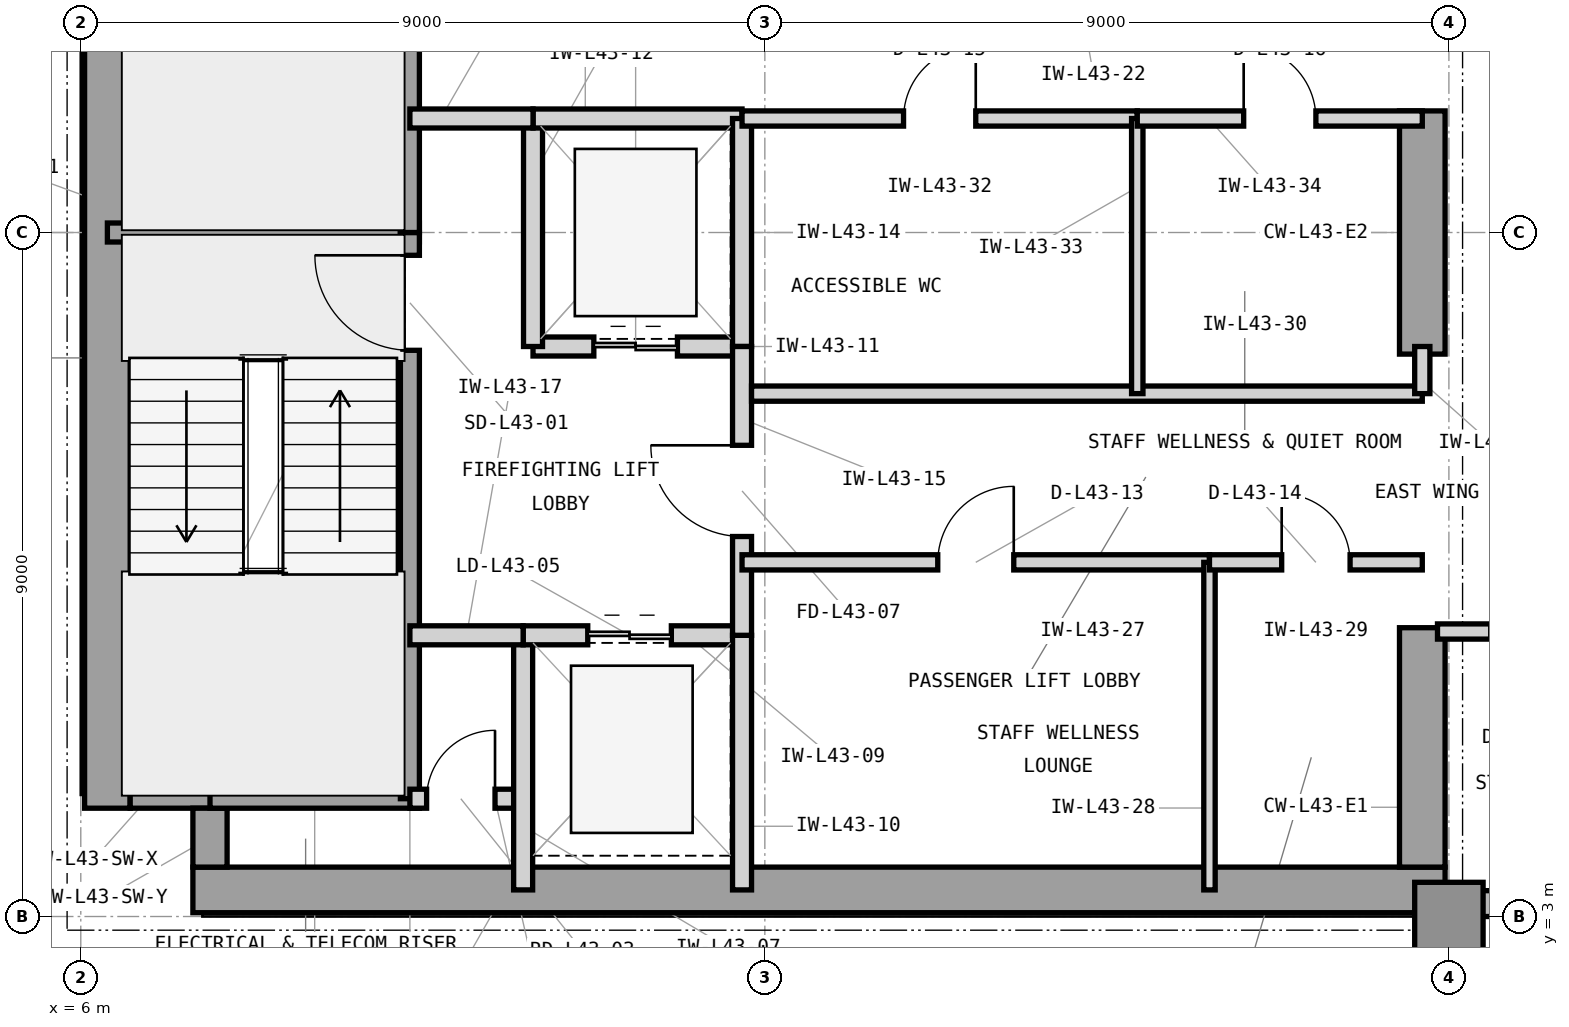
"""IFC4 building model, lengths in metres.
Left out: names, types, materials, properties, quantities, classifications, styles, units other than length and angle.
Written with IfcOpenShell. Run it as: python <this file> out.ifc"""

import sys

from ifc_helpers import new_model, si_unit, direction, frame, frame_2d, origin, origin_2d, place, context, subcontext, project, spatial, rectangle, extrude, element, fill, save


model = new_model("IFC4")
c1 = context("Model", 3, precision=1e-05, world=origin(), true_north=direction((0.0, 1.0)))
c2 = subcontext(c1, "Body", "Model", "MODEL_VIEW")
j1 = project(units=[si_unit("LENGTHUNIT", "METRE"), si_unit("PLANEANGLEUNIT", "RADIAN")], contexts=[c1])
p1 = place(None, origin())
s1 = spatial("IfcSite", under=j1, at=p1, CompositionType="ELEMENT")
p2 = place(p1, origin())
s2 = spatial("IfcBuilding", under=s1, at=p2, CompositionType="ELEMENT")
p3 = place(p2, frame((0.0, 0.0, 180.0)))
s3 = spatial("IfcBuildingStorey", under=s2, at=p3, CompositionType="ELEMENT", Elevation=180.0)
p4 = place(p3, frame((7.475, 3.35, 0.0), z_axis=(0.0, 0.0, 1.0), x_axis=(1.0, 0.0, 0.0)))
e1 = element("IfcWall", 1, at=p4, inside=s3, PredefinedType="SHEAR", context=c2, shape_type="SweptSolid", body=[
    extrude(rectangle(XDim=16.475, YDim=0.6, at=frame_2d((8.237, 0.0))), origin(), (0.0, 0.0, 1.0), 3.9),
])
p5 = place(p3, frame((6.35, 4.425, 0.0), z_axis=(0.0, 0.0, 1.0), x_axis=(0.0, 1.0, 0.0)))
e2 = element("IfcWall", 2, at=p5, inside=s3, PredefinedType="SHEAR", context=c2, shape_type="SweptSolid", body=[
    extrude(rectangle(XDim=15.15, YDim=0.6, at=frame_2d((7.575, 0.0))), origin(), (0.0, 0.0, 1.0), 3.9),
])
p6 = place(p3, frame((23.65, 3.65, 0.0), z_axis=(0.0, 0.0, 1.0), x_axis=(0.0, 1.0, 0.0)))
e3 = element("IfcWall", 3, at=p6, inside=s3, PredefinedType="SHEAR", context=c2, shape_type="SweptSolid", body=[
    extrude(rectangle(XDim=3.15, YDim=0.6, at=frame_2d((1.575, 0.0))), origin(), (0.0, 0.0, 1.0), 3.9),
])
p7 = place(p3, frame((23.65, 10.4, 0.0), z_axis=(0.0, 0.0, 1.0), x_axis=(0.0, 1.0, 0.0)))
e4 = element("IfcWall", 4, at=p7, inside=s3, PredefinedType="SHEAR", context=c2, shape_type="SweptSolid", body=[
    extrude(rectangle(XDim=3.2, YDim=0.6, at=frame_2d((1.6, 0.0))), origin(), (0.0, 0.0, 1.0), 3.9),
])
p8 = place(p3, frame((6.65, 4.65, 0.0), z_axis=(0.0, 0.0, 1.0), x_axis=(1.0, 0.0, 0.0)))
e5 = element("IfcWall", 5, at=p8, inside=s3, PredefinedType="SHEAR", context=c2, shape_type="SweptSolid", body=[
    extrude(rectangle(XDim=1.275, YDim=0.45, at=frame_2d((0.638, 0.0))), origin(), (0.0, 0.0, 1.0), 3.9),
])
p9 = place(p3, frame((7.7, 3.65, 0.0), z_axis=(0.0, 0.0, 1.0), x_axis=(0.0, 1.0, 0.0)))
e6 = element("IfcWall", 6, at=p9, inside=s3, PredefinedType="SHEAR", context=c2, shape_type="SweptSolid", body=[
    extrude(rectangle(XDim=0.775, YDim=0.45, at=frame_2d((0.388, 0.0))), origin(), (0.0, 0.0, 1.0), 3.9),
])
p10 = place(p3, frame((24.0, 3.0, 0.0), z_axis=(0.0, 0.0, 1.0), x_axis=(1.0, 0.0, 0.0)))
e7 = element("IfcColumn", 7, at=p10, inside=s3, PredefinedType="COLUMN", context=c2, shape_type="SweptSolid", body=[
    extrude(rectangle(XDim=0.9, YDim=0.9, at=origin_2d()), origin(), (0.0, 0.0, 1.0), 3.9),
])
p11 = place(p3, frame((23.9, 3.17, 0.0), z_axis=(0.0, 0.0, 1.0), x_axis=(1.0, 0.0, 0.0)))
e8 = element("IfcWall", 8, at=p11, inside=s3, PredefinedType="STANDARD", context=c2, shape_type="SweptSolid", body=[
    extrude(rectangle(XDim=31.5, YDim=0.34, at=frame_2d((15.75, 0.0))), origin(), (0.0, 0.0, 1.0), 3.7),
])
p12 = place(p11, frame((5.6, 0.0, 0.9)))
e9 = element("IfcOpeningElement", 9, at=p12, cuts=e8, PredefinedType="OPENING", context=c2, shape_type="SweptSolid", body=[
    extrude(rectangle(XDim=2.3, YDim=2.2, at=frame_2d((1.15, 1.1))), frame((0.0, 0.18, 0.0), z_axis=(0.0, -1.0, 0.0), x_axis=(1.0, 0.0, 0.0)), (0.0, 0.0, 1.0), 0.36),
])
p13 = place(p11, frame((14.6, 0.0, 0.9)))
e10 = element("IfcOpeningElement", 10, at=p13, cuts=e8, PredefinedType="OPENING", context=c2, shape_type="SweptSolid", body=[
    extrude(rectangle(XDim=2.3, YDim=2.2, at=frame_2d((1.15, 1.1))), frame((0.0, 0.18, 0.0), z_axis=(0.0, -1.0, 0.0), x_axis=(1.0, 0.0, 0.0)), (0.0, 0.0, 1.0), 0.36),
])
p14 = place(p11, frame((19.1, 0.0, 0.9)))
e11 = element("IfcOpeningElement", 11, at=p14, cuts=e8, PredefinedType="OPENING", context=c2, shape_type="SweptSolid", body=[
    extrude(rectangle(XDim=2.3, YDim=2.2, at=frame_2d((1.15, 1.1))), frame((0.0, 0.18, 0.0), z_axis=(0.0, -1.0, 0.0), x_axis=(1.0, 0.0, 0.0)), (0.0, 0.0, 1.0), 0.36),
])
p15 = place(p11, frame((0.9, 0.0, 0.9)))
e12 = element("IfcOpeningElement", 12, at=p15, cuts=e8, PredefinedType="OPENING", context=c2, shape_type="SweptSolid", body=[
    extrude(rectangle(XDim=1.6, YDim=2.2, at=frame_2d((0.8, 1.1))), frame((0.0, 0.18, 0.0), z_axis=(0.0, -1.0, 0.0), x_axis=(1.0, 0.0, 0.0)), (0.0, 0.0, 1.0), 0.36),
])
p16 = place(p3, frame((6.35, 12.0, 0.0), z_axis=(0.0, 0.0, 1.0), x_axis=(1.0, 0.0, 0.0)))
e13 = element("IfcWall", 13, at=p16, inside=s3, PredefinedType="SHEAR", context=c2, shape_type="SweptSolid", body=[
    extrude(rectangle(XDim=4.105, YDim=0.25, at=frame_2d((2.052, 0.0))), origin(), (0.0, 0.0, 1.0), 3.9),
])
p17 = place(p3, frame((7.7, 4.55, 0.0), z_axis=(0.0, 0.0, 1.0), x_axis=(1.0, 0.0, 0.0)))
e14 = element("IfcWall", 14, at=p17, inside=s3, PredefinedType="SHEAR", context=c2, shape_type="SweptSolid", body=[
    extrude(rectangle(XDim=2.755, YDim=0.25, at=frame_2d((1.377, 0.0))), origin(), (0.0, 0.0, 1.0), 3.9),
])
p18 = place(p3, frame((10.33, 4.55, 0.0), z_axis=(0.0, 0.0, 1.0), x_axis=(0.0, 1.0, 0.0)))
e15 = element("IfcWall", 15, at=p18, inside=s3, PredefinedType="SHEAR", context=c2, shape_type="SweptSolid", body=[
    extrude(rectangle(XDim=7.45, YDim=0.25, at=frame_2d((3.725, 0.0))), origin(), (0.0, 0.0, 1.0), 3.9),
])
p19 = place(p18, frame((5.9, 0.0, 0.0)))
e16 = element("IfcOpeningElement", 16, at=p19, cuts=e15, PredefinedType="OPENING", context=c2, shape_type="SweptSolid", body=[
    extrude(rectangle(XDim=1.25, YDim=2.2, at=frame_2d((0.625, 1.1))), frame((0.0, 0.135, 0.0), z_axis=(0.0, -1.0, 0.0), x_axis=(1.0, 0.0, 0.0)), (0.0, 0.0, 1.0), 0.27),
])
p20 = place(p3, frame((10.33, 12.0, 0.0), z_axis=(0.0, 0.0, 1.0), x_axis=(0.0, 1.0, 0.0)))
e17 = element("IfcWall", 17, at=p20, inside=s3, PredefinedType="SHEAR", context=c2, shape_type="SweptSolid", body=[
    extrude(rectangle(XDim=7.45, YDim=0.25, at=frame_2d((3.725, 0.0))), origin(), (0.0, 0.0, 1.0), 3.9),
])
p21 = place(p20, frame((5.85, 0.0, 0.0)))
e18 = element("IfcOpeningElement", 18, at=p21, cuts=e17, PredefinedType="OPENING", context=c2, shape_type="SweptSolid", body=[
    extrude(rectangle(XDim=1.25, YDim=2.2, at=frame_2d((0.625, 1.1))), frame((0.0, 0.135, 0.0), z_axis=(0.0, -1.0, 0.0), x_axis=(1.0, 0.0, 0.0)), (0.0, 0.0, 1.0), 0.27),
])
p22 = place(p3, frame((10.33, 4.55, 0.0), z_axis=(0.0, 0.0, 1.0), x_axis=(1.0, 0.0, 0.0)))
e19 = element("IfcWall", 19, at=p22, inside=s3, PredefinedType="PARTITIONING", context=c2, shape_type="SweptSolid", body=[
    extrude(rectangle(XDim=1.49, YDim=0.25, at=frame_2d((0.745, 0.0))), origin(), (0.0, 0.0, 1.0), 3.69),
])
p23 = place(p22, frame((0.22, 0.0, 0.0)))
e20 = element("IfcOpeningElement", 20, at=p23, cuts=e19, PredefinedType="OPENING", context=c2, shape_type="SweptSolid", body=[
    extrude(rectangle(XDim=0.9, YDim=2.1, at=frame_2d((0.45, 1.05))), frame((0.0, 0.135, 0.0), z_axis=(0.0, -1.0, 0.0), x_axis=(1.0, 0.0, 0.0)), (0.0, 0.0, 1.0), 0.27),
])
p24 = place(p3, frame((11.82, 3.35, 0.0), z_axis=(0.0, 0.0, 1.0), x_axis=(0.0, 1.0, 0.0)))
e21 = element("IfcWall", 21, at=p24, inside=s3, PredefinedType="PARTITIONING", context=c2, shape_type="SweptSolid", body=[
    extrude(rectangle(XDim=3.35, YDim=0.25, at=frame_2d((1.675, 0.0))), origin(), (0.0, 0.0, 1.0), 3.69),
])
p25 = place(p3, frame((11.82, 6.7, 0.0), z_axis=(0.0, 0.0, 1.0), x_axis=(1.0, 0.0, 0.0)))
e22 = element("IfcWall", 22, at=p25, inside=s3, PredefinedType="PARTITIONING", context=c2, shape_type="SweptSolid", body=[
    extrude(rectangle(XDim=2.88, YDim=0.25, at=frame_2d((1.44, 0.0))), origin(), (0.0, 0.0, 1.0), 3.283),
])
p26 = place(p25, frame((0.85, 0.0, 0.0)))
e23 = element("IfcOpeningElement", 23, at=p26, cuts=e22, PredefinedType="OPENING", context=c2, shape_type="SweptSolid", body=[
    extrude(rectangle(XDim=1.1, YDim=2.25, at=frame_2d((0.55, 1.125))), frame((0.0, 0.135, 0.0), z_axis=(0.0, -1.0, 0.0), x_axis=(1.0, 0.0, 0.0)), (0.0, 0.0, 1.0), 0.27),
])
p27 = place(p3, frame((14.7, 3.35, 0.0), z_axis=(0.0, 0.0, 1.0), x_axis=(0.0, 1.0, 0.0)))
e24 = element("IfcWall", 24, at=p27, inside=s3, PredefinedType="PARTITIONING", context=c2, shape_type="SweptSolid", body=[
    extrude(rectangle(XDim=3.35, YDim=0.25, at=frame_2d((1.675, 0.0))), origin(), (0.0, 0.0, 1.0), 3.69),
])
p28 = place(p3, frame((11.95, 10.5, 0.0), z_axis=(0.0, 0.0, 1.0), x_axis=(1.0, 0.0, 0.0)))
e25 = element("IfcWall", 25, at=p28, inside=s3, PredefinedType="PARTITIONING", context=c2, shape_type="SweptSolid", body=[
    extrude(rectangle(XDim=2.75, YDim=0.25, at=frame_2d((1.375, 0.0))), origin(), (0.0, 0.0, 1.0), 3.283),
])
p29 = place(p28, frame((0.8, 0.0, 0.0)))
e26 = element("IfcOpeningElement", 26, at=p29, cuts=e25, PredefinedType="OPENING", context=c2, shape_type="SweptSolid", body=[
    extrude(rectangle(XDim=1.1, YDim=2.25, at=frame_2d((0.55, 1.125))), frame((0.0, 0.135, 0.0), z_axis=(0.0, -1.0, 0.0), x_axis=(1.0, 0.0, 0.0)), (0.0, 0.0, 1.0), 0.27),
])
p30 = place(p3, frame((11.95, 10.5, 0.0), z_axis=(0.0, 0.0, 1.0), x_axis=(0.0, 1.0, 0.0)))
e27 = element("IfcWall", 27, at=p30, inside=s3, PredefinedType="PARTITIONING", context=c2, shape_type="SweptSolid", body=[
    extrude(rectangle(XDim=3.0, YDim=0.25, at=frame_2d((1.5, 0.0))), origin(), (0.0, 0.0, 1.0), 3.69),
])
p31 = place(p3, frame((11.95, 13.5, 0.0), z_axis=(0.0, 0.0, 1.0), x_axis=(1.0, 0.0, 0.0)))
e28 = element("IfcWall", 28, at=p31, inside=s3, PredefinedType="PARTITIONING", context=c2, shape_type="SweptSolid", body=[
    extrude(rectangle(XDim=2.75, YDim=0.25, at=frame_2d((1.375, 0.0))), origin(), (0.0, 0.0, 1.0), 3.283),
])
p32 = place(p3, frame((14.7, 10.5, 0.0), z_axis=(0.0, 0.0, 1.0), x_axis=(0.0, 1.0, 0.0)))
e29 = element("IfcWall", 29, at=p32, inside=s3, PredefinedType="PARTITIONING", context=c2, shape_type="SweptSolid", body=[
    extrude(rectangle(XDim=3.0, YDim=0.25, at=frame_2d((1.5, 0.0))), origin(), (0.0, 0.0, 1.0), 3.69),
])
p33 = place(p3, frame((14.7, 6.7, 0.0), z_axis=(0.0, 0.0, 1.0), x_axis=(0.0, 1.0, 0.0)))
e30 = element("IfcWall", 30, at=p33, inside=s3, PredefinedType="PARTITIONING", context=c2, shape_type="SweptSolid", body=[
    extrude(rectangle(XDim=3.8, YDim=0.25, at=frame_2d((1.9, 0.0))), origin(), (0.0, 0.0, 1.0), 3.69),
])
p34 = place(p33, frame((1.3, 0.0, 0.0)))
e31 = element("IfcOpeningElement", 31, at=p34, cuts=e30, PredefinedType="OPENING", context=c2, shape_type="SweptSolid", body=[
    extrude(rectangle(XDim=1.2, YDim=2.2, at=frame_2d((0.6, 1.1))), frame((0.0, 0.135, 0.0), z_axis=(0.0, -1.0, 0.0), x_axis=(1.0, 0.0, 0.0)), (0.0, 0.0, 1.0), 0.27),
])
p35 = place(p3, frame((10.33, 13.5, 0.0), z_axis=(0.0, 0.0, 1.0), x_axis=(1.0, 0.0, 0.0)))
e32 = element("IfcWall", 32, at=p35, inside=s3, PredefinedType="PARTITIONING", context=c2, shape_type="SweptSolid", body=[
    extrude(rectangle(XDim=1.62, YDim=0.25, at=frame_2d((0.81, 0.0))), origin(), (0.0, 0.0, 1.0), 3.283),
])
p36 = place(p3, frame((10.33, 6.7, 0.0), z_axis=(0.0, 0.0, 1.0), x_axis=(1.0, 0.0, 0.0)))
e33 = element("IfcWall", 33, at=p36, inside=s3, PredefinedType="PARTITIONING", context=c2, shape_type="SweptSolid", body=[
    extrude(rectangle(XDim=1.49, YDim=0.25, at=frame_2d((0.745, 0.0))), origin(), (0.0, 0.0, 1.0), 3.283),
])
p37 = place(p3, frame((14.7, 7.66, 0.0), z_axis=(0.0, 0.0, 1.0), x_axis=(1.0, 0.0, 0.0)))
e34 = element("IfcWall", 34, at=p37, inside=s3, PredefinedType="PARTITIONING", context=c2, shape_type="SweptSolid", body=[
    extrude(rectangle(XDim=6.15, YDim=0.2, at=frame_2d((3.075, 0.0))), origin(), (0.0, 0.0, 1.0), 3.69),
])
p38 = place(p37, frame((2.575, 0.0, 0.0)))
e35 = element("IfcOpeningElement", 35, at=p38, cuts=e34, PredefinedType="OPENING", context=c2, shape_type="SweptSolid", body=[
    extrude(rectangle(XDim=1.0, YDim=2.15, at=frame_2d((0.5, 1.075))), frame((0.0, 0.11, 0.0), z_axis=(0.0, -1.0, 0.0), x_axis=(1.0, 0.0, 0.0)), (0.0, 0.0, 1.0), 0.22),
])
p39 = place(p3, frame((20.85, 3.35, 0.0), z_axis=(0.0, 0.0, 1.0), x_axis=(0.0, 1.0, 0.0)))
e36 = element("IfcWall", 36, at=p39, inside=s3, PredefinedType="PARTITIONING", context=c2, shape_type="SweptSolid", body=[
    extrude(rectangle(XDim=4.31, YDim=0.15, at=frame_2d((2.155, 0.0))), origin(), (0.0, 0.0, 1.0), 3.69),
])
p40 = place(p3, frame((20.85, 7.66, 0.0), z_axis=(0.0, 0.0, 1.0), x_axis=(1.0, 0.0, 0.0)))
e37 = element("IfcWall", 37, at=p40, inside=s3, PredefinedType="PARTITIONING", context=c2, shape_type="SweptSolid", body=[
    extrude(rectangle(XDim=2.8, YDim=0.2, at=frame_2d((1.4, 0.0))), origin(), (0.0, 0.0, 1.0), 3.69),
])
p41 = place(p40, frame((0.95, 0.0, 0.0)))
e38 = element("IfcOpeningElement", 38, at=p41, cuts=e37, PredefinedType="OPENING", context=c2, shape_type="SweptSolid", body=[
    extrude(rectangle(XDim=0.9, YDim=2.1, at=frame_2d((0.45, 1.05))), frame((0.0, 0.11, 0.0), z_axis=(0.0, -1.0, 0.0), x_axis=(1.0, 0.0, 0.0)), (0.0, 0.0, 1.0), 0.22),
])
p42 = place(p3, frame((14.825, 9.88, 0.0), z_axis=(0.0, 0.0, 1.0), x_axis=(1.0, 0.0, 0.0)))
e39 = element("IfcWall", 39, at=p42, inside=s3, PredefinedType="PARTITIONING", context=c2, shape_type="SweptSolid", body=[
    extrude(rectangle(XDim=8.825, YDim=0.2, at=frame_2d((4.413, 0.0))), origin(), (0.0, 0.0, 1.0), 3.69),
])
p43 = place(p3, frame((23.65, 9.88, 0.0), z_axis=(0.0, 0.0, 1.0), x_axis=(0.0, 1.0, 0.0)))
e40 = element("IfcWall", 40, at=p43, inside=s3, PredefinedType="PARTITIONING", context=c2, shape_type="SweptSolid", body=[
    extrude(rectangle(XDim=0.62, YDim=0.2, at=frame_2d((0.31, 0.0))), origin(), (0.0, 0.0, 1.0), 3.69),
])
p44 = place(p3, frame((14.7, 13.5, 0.0), z_axis=(0.0, 0.0, 1.0), x_axis=(1.0, 0.0, 0.0)))
e41 = element("IfcWall", 41, at=p44, inside=s3, PredefinedType="PARTITIONING", context=c2, shape_type="SweptSolid", body=[
    extrude(rectangle(XDim=5.2, YDim=0.2, at=frame_2d((2.6, 0.0))), origin(), (0.0, 0.0, 1.0), 3.283),
])
p45 = place(p44, frame((2.125, 0.0, 0.0)))
e42 = element("IfcOpeningElement", 42, at=p45, cuts=e41, PredefinedType="OPENING", context=c2, shape_type="SweptSolid", body=[
    extrude(rectangle(XDim=0.95, YDim=2.1, at=frame_2d((0.475, 1.05))), frame((0.0, 0.11, 0.0), z_axis=(0.0, -1.0, 0.0), x_axis=(1.0, 0.0, 0.0)), (0.0, 0.0, 1.0), 0.22),
])
p46 = place(p3, frame((19.9, 9.88, 0.0), z_axis=(0.0, 0.0, 1.0), x_axis=(0.0, 1.0, 0.0)))
e43 = element("IfcWall", 43, at=p46, inside=s3, PredefinedType="PARTITIONING", context=c2, shape_type="SweptSolid", body=[
    extrude(rectangle(XDim=3.62, YDim=0.15, at=frame_2d((1.81, 0.0))), origin(), (0.0, 0.0, 1.0), 3.69),
])
p47 = place(p3, frame((19.9, 13.5, 0.0), z_axis=(0.0, 0.0, 1.0), x_axis=(1.0, 0.0, 0.0)))
e44 = element("IfcWall", 44, at=p47, inside=s3, PredefinedType="PARTITIONING", context=c2, shape_type="SweptSolid", body=[
    extrude(rectangle(XDim=3.75, YDim=0.2, at=frame_2d((1.875, 0.0))), origin(), (0.0, 0.0, 1.0), 3.283),
])
p48 = place(p47, frame((1.4, 0.0, 0.0)))
e45 = element("IfcOpeningElement", 45, at=p48, cuts=e44, PredefinedType="OPENING", context=c2, shape_type="SweptSolid", body=[
    extrude(rectangle(XDim=0.95, YDim=2.1, at=frame_2d((0.475, 1.05))), frame((0.0, 0.11, 0.0), z_axis=(0.0, -1.0, 0.0), x_axis=(1.0, 0.0, 0.0)), (0.0, 0.0, 1.0), 0.22),
])
p49 = place(p3, frame((23.85, 6.75, 0.0), z_axis=(0.0, 0.0, 1.0), x_axis=(1.0, 0.0, 0.0)))
e46 = element("IfcWall", 46, at=p49, inside=s3, PredefinedType="PARTITIONING", context=c2, shape_type="SweptSolid", body=[
    extrude(rectangle(XDim=2.85, YDim=0.2, at=frame_2d((1.425, 0.0))), origin(), (0.0, 0.0, 1.0), 3.69),
])
p50 = place(p49, frame((0.7, 0.0, 0.0)))
e47 = element("IfcOpeningElement", 47, at=p50, cuts=e46, PredefinedType="OPENING", context=c2, shape_type="SweptSolid", body=[
    extrude(rectangle(XDim=1.0, YDim=2.15, at=frame_2d((0.5, 1.075))), frame((0.0, 0.11, 0.0), z_axis=(0.0, -1.0, 0.0), x_axis=(1.0, 0.0, 0.0)), (0.0, 0.0, 1.0), 0.22),
])
p51 = place(p19, origin())
e48 = element("IfcDoor", 48, at=p51, inside=s3, OperationType="SINGLE_SWING_RIGHT", PredefinedType="DOOR", context=c2, shape_type="SweptSolid", body=[
    extrude(rectangle(XDim=1.25, YDim=2.2, at=frame_2d((0.625, 1.1))), frame((0.0, 0.025, 0.0), z_axis=(0.0, -1.0, 0.0), x_axis=(1.0, 0.0, 0.0)), (0.0, 0.0, 1.0), 0.05),
])
fill(e16, e48)
p52 = place(p23, origin())
e49 = element("IfcDoor", 49, at=p52, inside=s3, OperationType="SINGLE_SWING_RIGHT", PredefinedType="TRAPDOOR", context=c2, shape_type="SweptSolid", body=[
    extrude(rectangle(XDim=0.9, YDim=2.1, at=frame_2d((0.45, 1.05))), frame((0.0, 0.025, 0.0), z_axis=(0.0, -1.0, 0.0), x_axis=(1.0, 0.0, 0.0)), (0.0, 0.0, 1.0), 0.05),
])
fill(e20, e49)
p53 = place(p26, origin())
e50 = element("IfcDoor", 50, at=p53, inside=s3, OperationType="DOUBLE_DOOR_SLIDING", PredefinedType="DOOR", context=c2, shape_type="SweptSolid", body=[
    extrude(rectangle(XDim=1.1, YDim=2.25, at=frame_2d((0.55, 1.125))), frame((0.0, 0.025, 0.0), z_axis=(0.0, -1.0, 0.0), x_axis=(1.0, 0.0, 0.0)), (0.0, 0.0, 1.0), 0.05),
])
fill(e23, e50)
p54 = place(p29, origin())
e51 = element("IfcDoor", 51, at=p54, inside=s3, OperationType="DOUBLE_DOOR_SLIDING", PredefinedType="DOOR", context=c2, shape_type="SweptSolid", body=[
    extrude(rectangle(XDim=1.1, YDim=2.25, at=frame_2d((0.55, 1.125))), frame((0.0, 0.025, 0.0), z_axis=(0.0, -1.0, 0.0), x_axis=(1.0, 0.0, 0.0)), (0.0, 0.0, 1.0), 0.05),
])
fill(e26, e51)
p55 = place(p34, origin())
e52 = element("IfcDoor", 52, at=p55, inside=s3, OperationType="SINGLE_SWING_RIGHT", PredefinedType="DOOR", context=c2, shape_type="SweptSolid", body=[
    extrude(rectangle(XDim=1.2, YDim=2.2, at=frame_2d((0.6, 1.1))), frame((0.0, 0.025, 0.0), z_axis=(0.0, -1.0, 0.0), x_axis=(1.0, 0.0, 0.0)), (0.0, 0.0, 1.0), 0.05),
])
fill(e31, e52)
p56 = place(p38, origin())
e53 = element("IfcDoor", 53, at=p56, inside=s3, OperationType="SINGLE_SWING_RIGHT", PredefinedType="DOOR", context=c2, shape_type="SweptSolid", body=[
    extrude(rectangle(XDim=1.0, YDim=2.15, at=frame_2d((0.5, 1.075))), frame((0.0, 0.025, 0.0), z_axis=(0.0, -1.0, 0.0), x_axis=(1.0, 0.0, 0.0)), (0.0, 0.0, 1.0), 0.05),
])
fill(e35, e53)
p57 = place(p41, origin())
e54 = element("IfcDoor", 54, at=p57, inside=s3, OperationType="SINGLE_SWING_LEFT", PredefinedType="TRAPDOOR", context=c2, shape_type="SweptSolid", body=[
    extrude(rectangle(XDim=0.9, YDim=2.1, at=frame_2d((0.45, 1.05))), frame((0.0, 0.025, 0.0), z_axis=(0.0, -1.0, 0.0), x_axis=(1.0, 0.0, 0.0)), (0.0, 0.0, 1.0), 0.05),
])
fill(e38, e54)
p58 = place(p45, origin())
e55 = element("IfcDoor", 55, at=p58, inside=s3, OperationType="SINGLE_SWING_RIGHT", PredefinedType="DOOR", context=c2, shape_type="SweptSolid", body=[
    extrude(rectangle(XDim=0.95, YDim=2.1, at=frame_2d((0.475, 1.05))), frame((0.0, 0.025, 0.0), z_axis=(0.0, -1.0, 0.0), x_axis=(1.0, 0.0, 0.0)), (0.0, 0.0, 1.0), 0.05),
])
fill(e42, e55)
p59 = place(p48, origin())
e56 = element("IfcDoor", 56, at=p59, inside=s3, OperationType="SINGLE_SWING_LEFT", PredefinedType="DOOR", context=c2, shape_type="SweptSolid", body=[
    extrude(rectangle(XDim=0.95, YDim=2.1, at=frame_2d((0.475, 1.05))), frame((0.0, 0.025, 0.0), z_axis=(0.0, -1.0, 0.0), x_axis=(1.0, 0.0, 0.0)), (0.0, 0.0, 1.0), 0.05),
])
fill(e45, e56)
save(model, sys.argv[1])
